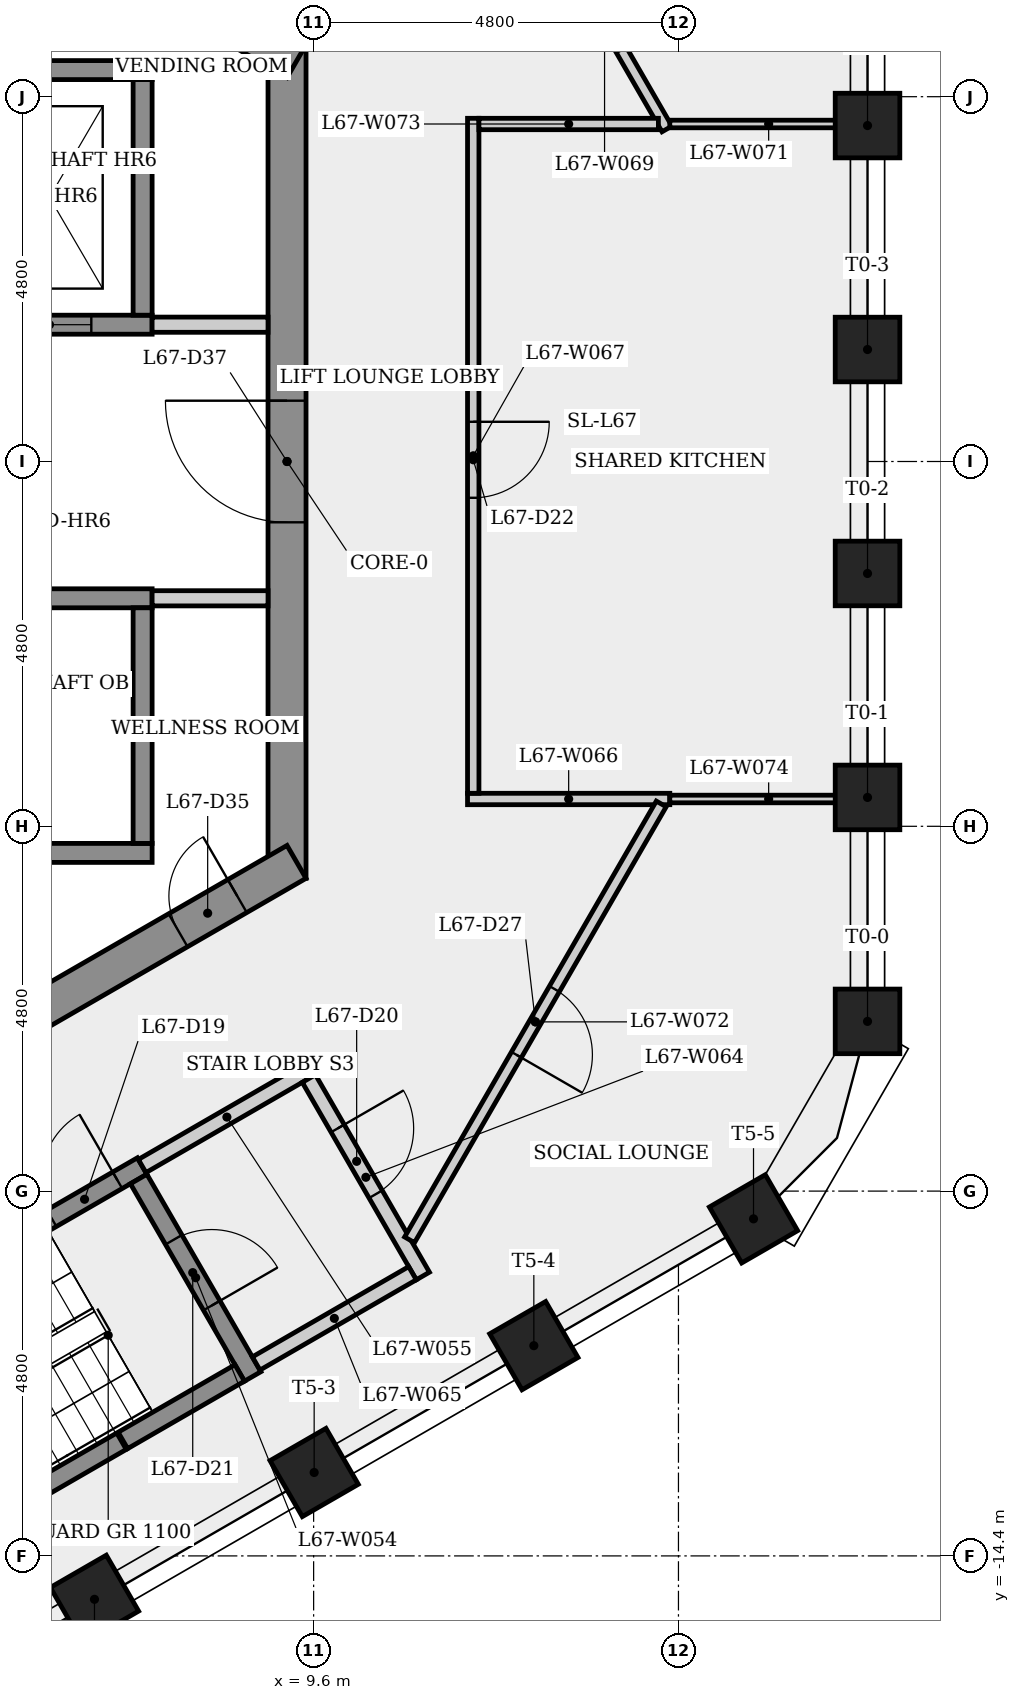
"""IFC4 building model, lengths in metres.
Left out: names, types, materials, properties, quantities, classifications, styles, units other than length and angle.
Written with IfcOpenShell. Run it as: python <this file> out.ifc"""

import sys

from ifc_helpers import new_model, si_unit, direction, frame, frame_2d, origin, origin_2d, place, context, subcontext, project, spatial, rectangle, extrude, element, fill, save


model = new_model("IFC4")
c1 = context("Model", 3, precision=1e-05, world=origin(), true_north=direction((0.0, 1.0)))
c2 = subcontext(c1, "Body", "Model", "MODEL_VIEW")
j1 = project(units=[si_unit("LENGTHUNIT", "METRE"), si_unit("PLANEANGLEUNIT", "RADIAN")], contexts=[c1])
p1 = place(None, origin())
s1 = spatial("IfcSite", under=j1, at=p1, CompositionType="ELEMENT")
p2 = place(p1, origin())
s2 = spatial("IfcBuilding", under=s1, at=p2, CompositionType="ELEMENT")
p3 = place(p2, frame((0.0, 0.0, 249.5)))
s3 = spatial("IfcBuildingStorey", under=s2, at=p3, CompositionType="ELEMENT", Elevation=249.5)
p4 = place(p3, frame((9.25, -5.485, 0.0), z_axis=(0.0, 0.0, 1.0), x_axis=(0.0, 1.0, 0.0)))
e1 = element("IfcWall", 1, at=p4, inside=s3, PredefinedType="SHEAR", context=c2, shape_type="SweptSolid", body=[
    extrude(rectangle(XDim=10.97, YDim=0.5, at=frame_2d((5.485, 0.0))), origin(), (0.0, 0.0, 1.0), 3.4),
])
p5 = place(p4, frame((4.685, 0.0, 0.0)))
e2 = element("IfcOpeningElement", 2, at=p5, cuts=e1, PredefinedType="OPENING", context=c2, shape_type="SweptSolid", body=[
    extrude(rectangle(XDim=1.6, YDim=2.1, at=frame_2d((0.8, 1.05))), frame((0.0, 0.26, 0.0), z_axis=(0.0, -1.0, 0.0), x_axis=(1.0, 0.0, 0.0)), (0.0, 0.0, 1.0), 0.52),
])
p6 = place(p3, frame((9.375, 5.268, 0.0), z_axis=(0.0, 0.0, 1.0), x_axis=(-0.866023993627, 0.500002442456, 0.0)))
e3 = element("IfcWall", 3, at=p6, inside=s3, PredefinedType="SHEAR", context=c2, shape_type="SweptSolid", body=[
    extrude(rectangle(XDim=10.97, YDim=0.5, at=frame_2d((5.485, 0.0))), origin(), (0.0, 0.0, 1.0), 3.4),
])
p7 = place(p6, frame((8.5, 0.0, 0.0)))
e4 = element("IfcOpeningElement", 4, at=p7, cuts=e3, PredefinedType="OPENING", context=c2, shape_type="SweptSolid", body=[
    extrude(rectangle(XDim=0.9, YDim=2.1, at=frame_2d((0.45, 1.05))), frame((0.0, 0.26, 0.0), z_axis=(0.0, -1.0, 0.0), x_axis=(1.0, 0.0, 0.0)), (0.0, 0.0, 1.0), 0.52),
])
p8 = place(p6, frame((3.28, 0.0, 0.0)))
e5 = element("IfcOpeningElement", 5, at=p8, cuts=e3, PredefinedType="OPENING", context=c2, shape_type="SweptSolid", body=[
    extrude(rectangle(XDim=0.9, YDim=2.1, at=frame_2d((0.45, 1.05))), frame((0.0, 0.26, 0.0), z_axis=(0.0, -1.0, 0.0), x_axis=(1.0, 0.0, 0.0)), (0.0, 0.0, 1.0), 0.52),
])
p9 = place(p3, frame((-0.125, -10.753, 0.0), z_axis=(0.0, 0.0, 1.0), x_axis=(0.866023993627, 0.500002442456, 0.0)))
e6 = element("IfcWall", 6, at=p9, inside=s3, PredefinedType="SHEAR", context=c2, shape_type="SweptSolid", body=[
    extrude(rectangle(XDim=10.97, YDim=0.5, at=frame_2d((5.485, 0.0))), origin(), (0.0, 0.0, 1.0), 3.4),
])
p10 = place(p9, frame((0.9, 0.0, 0.0)))
e7 = element("IfcOpeningElement", 7, at=p10, cuts=e6, PredefinedType="OPENING", context=c2, shape_type="SweptSolid", body=[
    extrude(rectangle(XDim=0.9, YDim=2.1, at=frame_2d((0.45, 1.05))), frame((0.0, 0.26, 0.0), z_axis=(0.0, -1.0, 0.0), x_axis=(1.0, 0.0, 0.0)), (0.0, 0.0, 1.0), 0.52),
])
p11 = place(p9, frame((9.17, 0.0, 0.0)))
e8 = element("IfcOpeningElement", 8, at=p11, cuts=e6, PredefinedType="OPENING", context=c2, shape_type="SweptSolid", body=[
    extrude(rectangle(XDim=0.9, YDim=2.1, at=frame_2d((0.45, 1.05))), frame((0.0, 0.26, 0.0), z_axis=(0.0, -1.0, 0.0), x_axis=(1.0, 0.0, 0.0)), (0.0, 0.0, 1.0), 0.52),
])
for number, where, z_axis, x_axis in (
    (9, (16.887, -7.367, 0.0), (0.0, 0.0, 1.0), (1.0, 0.0, 0.0)),
    (10, (16.887, -4.42, 0.0), (0.0, 0.0, 1.0), (1.0, 0.0, 0.0)),
    (11, (16.887, -1.473, 0.0), (0.0, 0.0, 1.0), (1.0, 0.0, 0.0)),
    (12, (16.887, 1.473, 0.0), (0.0, 0.0, 1.0), (1.0, 0.0, 0.0)),
    (13, (16.887, 4.42, 0.0), (0.0, 0.0, 1.0), (1.0, 0.0, 0.0)),
    (14, (6.717, -14.971, 0.0), (0.0, 0.0, 1.0), (0.5, -0.866, 0.0)),
    (15, (9.607, -13.302, 0.0), (0.0, 0.0, 1.0), (0.5, -0.866, 0.0)),
    (16, (12.497, -11.634, 0.0), (0.0, 0.0, 1.0), (0.5, -0.866, 0.0)),
    (17, (15.387, -9.965, 0.0), (0.0, 0.0, 1.0), (0.5, -0.866, 0.0)),
):
    element("IfcColumn", number, at=place(p3, frame(where, z_axis=z_axis, x_axis=x_axis)), inside=s3, PredefinedType="COLUMN", context=c2, shape_type="SweptSolid", body=[
        extrude(rectangle(XDim=0.85, YDim=0.85, at=origin_2d()), origin(), (0.0, 0.0, 1.0), 3.4),
    ])
p12 = place(p3, frame((-7.475, 1.8, 0.0), z_axis=(0.0, 0.0, 1.0), x_axis=(1.0, 0.0, 0.0)))
e18 = element("IfcWall", 18, at=p12, inside=s3, PredefinedType="SHEAR", context=c2, shape_type="SweptSolid", body=[
    extrude(rectangle(XDim=14.95, YDim=0.25, at=frame_2d((7.475, 0.0))), origin(), (0.0, 0.0, 1.0), 3.0),
])
p13 = place(p12, frame((0.8, 0.0, 0.0)))
e19 = element("IfcOpeningElement", 19, at=p13, cuts=e18, PredefinedType="OPENING", context=c2, shape_type="SweptSolid", body=[
    extrude(rectangle(XDim=1.1, YDim=2.1, at=frame_2d((0.55, 1.05))), frame((0.0, 0.135, 0.0), z_axis=(0.0, -1.0, 0.0), x_axis=(1.0, 0.0, 0.0)), (0.0, 0.0, 1.0), 0.27),
])
p14 = place(p12, frame((3.25, 0.0, 0.0)))
e20 = element("IfcOpeningElement", 20, at=p14, cuts=e18, PredefinedType="OPENING", context=c2, shape_type="SweptSolid", body=[
    extrude(rectangle(XDim=1.1, YDim=2.1, at=frame_2d((0.55, 1.05))), frame((0.0, 0.135, 0.0), z_axis=(0.0, -1.0, 0.0), x_axis=(1.0, 0.0, 0.0)), (0.0, 0.0, 1.0), 0.27),
])
p15 = place(p12, frame((5.7, 0.0, 0.0)))
e21 = element("IfcOpeningElement", 21, at=p15, cuts=e18, PredefinedType="OPENING", context=c2, shape_type="SweptSolid", body=[
    extrude(rectangle(XDim=1.1, YDim=2.1, at=frame_2d((0.55, 1.05))), frame((0.0, 0.135, 0.0), z_axis=(0.0, -1.0, 0.0), x_axis=(1.0, 0.0, 0.0)), (0.0, 0.0, 1.0), 0.27),
])
p16 = place(p12, frame((8.15, 0.0, 0.0)))
e22 = element("IfcOpeningElement", 22, at=p16, cuts=e18, PredefinedType="OPENING", context=c2, shape_type="SweptSolid", body=[
    extrude(rectangle(XDim=1.1, YDim=2.1, at=frame_2d((0.55, 1.05))), frame((0.0, 0.135, 0.0), z_axis=(0.0, -1.0, 0.0), x_axis=(1.0, 0.0, 0.0)), (0.0, 0.0, 1.0), 0.27),
])
p17 = place(p12, frame((10.6, 0.0, 0.0)))
e23 = element("IfcOpeningElement", 23, at=p17, cuts=e18, PredefinedType="OPENING", context=c2, shape_type="SweptSolid", body=[
    extrude(rectangle(XDim=1.1, YDim=2.1, at=frame_2d((0.55, 1.05))), frame((0.0, 0.135, 0.0), z_axis=(0.0, -1.0, 0.0), x_axis=(1.0, 0.0, 0.0)), (0.0, 0.0, 1.0), 0.27),
])
p18 = place(p12, frame((13.05, 0.0, 0.0)))
e24 = element("IfcOpeningElement", 24, at=p18, cuts=e18, PredefinedType="OPENING", context=c2, shape_type="SweptSolid", body=[
    extrude(rectangle(XDim=1.1, YDim=2.1, at=frame_2d((0.55, 1.05))), frame((0.0, 0.135, 0.0), z_axis=(0.0, -1.0, 0.0), x_axis=(1.0, 0.0, 0.0)), (0.0, 0.0, 1.0), 0.27),
])
p19 = place(p3, frame((-7.225, 5.15, 0.0), z_axis=(0.0, 0.0, 1.0), x_axis=(1.0, 0.0, 0.0)))
e25 = element("IfcWall", 25, at=p19, inside=s3, PredefinedType="SHEAR", context=c2, shape_type="SweptSolid", body=[
    extrude(rectangle(XDim=14.7, YDim=0.25, at=frame_2d((7.35, 0.0))), origin(), (0.0, 0.0, 1.0), 3.0),
])
p20 = place(p3, frame((1.693, -12.532, 0.0), z_axis=(0.0, 0.0, 1.0), x_axis=(0.866031063448, 0.499990197047, 0.0)))
e26 = element("IfcWall", 26, at=p20, inside=s3, PredefinedType="SHEAR", context=c2, shape_type="SweptSolid", body=[
    extrude(rectangle(XDim=6.525, YDim=0.25, at=frame_2d((3.263, 0.0))), origin(), (0.0, 0.0, 1.0), 3.0),
])
p21 = place(p20, frame((5.15, 0.0, 0.0)))
e27 = element("IfcOpeningElement", 27, at=p21, cuts=e26, PredefinedType="OPENING", context=c2, shape_type="SweptSolid", body=[
    extrude(rectangle(XDim=1.0, YDim=2.1, at=frame_2d((0.5, 1.05))), frame((0.0, 0.135, 0.0), z_axis=(0.0, -1.0, 0.0), x_axis=(1.0, 0.0, 0.0)), (0.0, 0.0, 1.0), 0.27),
])
p22 = place(p3, frame((2.575, -5.15, 0.0), z_axis=(0.0, 0.0, 1.0), x_axis=(1.0, 0.0, 0.0)))
e28 = element("IfcWall", 28, at=p22, inside=s3, PredefinedType="SHEAR", context=c2, shape_type="SweptSolid", body=[
    extrude(rectangle(XDim=4.9, YDim=0.25, at=frame_2d((2.45, 0.0))), origin(), (0.0, 0.0, 1.0), 3.0),
])
p23 = place(p3, frame((2.575, -1.8, 0.0), z_axis=(0.0, 0.0, 1.0), x_axis=(1.0, 0.0, 0.0)))
e29 = element("IfcWall", 29, at=p23, inside=s3, PredefinedType="SHEAR", context=c2, shape_type="SweptSolid", body=[
    extrude(rectangle(XDim=4.9, YDim=0.25, at=frame_2d((2.45, 0.0))), origin(), (0.0, 0.0, 1.0), 3.0),
])
p24 = place(p23, frame((0.597, 0.0, 0.0)))
e30 = element("IfcOpeningElement", 30, at=p24, cuts=e29, PredefinedType="OPENING", context=c2, shape_type="SweptSolid", body=[
    extrude(rectangle(XDim=1.1, YDim=2.1, at=frame_2d((0.55, 1.05))), frame((0.0, 0.135, 0.0), z_axis=(0.0, -1.0, 0.0), x_axis=(1.0, 0.0, 0.0)), (0.0, 0.0, 1.0), 0.27),
])
p25 = place(p3, frame((7.073, -12.891, 0.0), z_axis=(0.0, 0.0, 1.0), x_axis=(-0.866023145199, -0.500003911965, 0.0)))
e31 = element("IfcWall", 31, at=p25, inside=s3, PredefinedType="SHEAR", context=c2, shape_type="SweptSolid", body=[
    extrude(rectangle(XDim=4.355, YDim=0.25, at=frame_2d((2.177, 0.0))), origin(), (0.0, 0.0, 1.0), 3.0),
])
p26 = place(p3, frame((7.298, -9.441, 0.0), z_axis=(0.0, 0.0, 1.0), x_axis=(0.50002537861, -0.866010750942, 0.0)))
e32 = element("IfcWall", 32, at=p26, inside=s3, PredefinedType="SHEAR", context=c2, shape_type="SweptSolid", body=[
    extrude(rectangle(XDim=3.0, YDim=0.25, at=frame_2d((1.5, 0.0))), origin(), (0.0, 0.0, 1.0), 3.0),
])
p27 = place(p26, frame((0.923, 0.0, 0.0)))
e33 = element("IfcOpeningElement", 33, at=p27, cuts=e32, PredefinedType="OPENING", context=c2, shape_type="SweptSolid", body=[
    extrude(rectangle(XDim=1.0, YDim=2.1, at=frame_2d((0.5, 1.05))), frame((0.0, 0.135, 0.0), z_axis=(0.0, -1.0, 0.0), x_axis=(1.0, 0.0, 0.0)), (0.0, 0.0, 1.0), 0.27),
])
p28 = place(p3, frame((7.344, -9.27, 0.0), z_axis=(0.0, 0.0, 1.0), x_axis=(0.866005588531, 0.500034319456, 0.0)))
e34 = element("IfcWall", 34, at=p28, inside=s3, PredefinedType="PARTITIONING", context=c2, shape_type="SweptSolid", body=[
    extrude(rectangle(XDim=2.575, YDim=0.2, at=frame_2d((1.288, 0.0))), origin(), (0.0, 0.0, 1.0), 3.0),
])
p29 = place(p3, frame((7.475, 1.8, 0.0), z_axis=(0.0, 0.0, 1.0), x_axis=(1.0, 0.0, 0.0)))
e35 = element("IfcWall", 35, at=p29, inside=s3, PredefinedType="PARTITIONING", context=c2, shape_type="SweptSolid", body=[
    extrude(rectangle(XDim=1.525, YDim=0.2, at=frame_2d((0.763, 0.0))), origin(), (0.0, 0.0, 1.0), 3.0),
])
for number, where, z_axis, x_axis in (
    (36, (7.35, -1.925, 0.0), (0.0, 0.0, 1.0), (0.0, -1.0, 0.0)),
    (37, (7.35, 5.025, 0.0), (0.0, 0.0, 1.0), (0.0, -1.0, 0.0)),
):
    element("IfcWall", number, at=place(p3, frame(where, z_axis=z_axis, x_axis=x_axis)), inside=s3, PredefinedType="SHEAR", context=c2, shape_type="SweptSolid", body=[
        extrude(rectangle(XDim=3.1, YDim=0.25, at=frame_2d((1.55, 0.0))), origin(), (0.0, 0.0, 1.0), 3.4),
    ])
p30 = place(p3, frame((8.627, -11.993, 0.0), z_axis=(0.0, 0.0, 1.0), x_axis=(-0.866059624469, -0.499940723351, 0.0)))
e38 = element("IfcWall", 38, at=p30, inside=s3, PredefinedType="SHEAR", context=c2, shape_type="SweptSolid", body=[
    extrude(rectangle(XDim=1.775, YDim=0.25, at=frame_2d((0.888, 0.0))), origin(), (0.0, 0.0, 1.0), 3.0),
])
p31 = place(p3, frame((9.0, -1.8, 0.0), z_axis=(0.0, 0.0, 1.0), x_axis=(-1.0, 0.0, 0.0)))
e39 = element("IfcWall", 39, at=p31, inside=s3, PredefinedType="PARTITIONING", context=c2, shape_type="SweptSolid", body=[
    extrude(rectangle(XDim=1.525, YDim=0.2, at=frame_2d((0.763, 0.0))), origin(), (0.0, 0.0, 1.0), 3.0),
])
p32 = place(p3, frame((9.537, -8.119, 0.0), z_axis=(0.0, 0.0, 1.0), x_axis=(0.499990139034, -0.866031096941, 0.0)))
e40 = element("IfcWall", 40, at=p32, inside=s3, PredefinedType="PARTITIONING", context=c2, shape_type="SweptSolid", body=[
    extrude(rectangle(XDim=3.0, YDim=0.2, at=frame_2d((1.5, 0.0))), origin(), (0.0, 0.0, 1.0), 3.0),
])
p33 = place(p32, frame((0.758, 0.0, 0.0)))
e41 = element("IfcOpeningElement", 41, at=p33, cuts=e40, PredefinedType="OPENING", context=c2, shape_type="SweptSolid", body=[
    extrude(rectangle(XDim=1.0, YDim=2.1, at=frame_2d((0.5, 1.05))), frame((0.0, 0.11, 0.0), z_axis=(0.0, -1.0, 0.0), x_axis=(1.0, 0.0, 0.0)), (0.0, 0.0, 1.0), 0.22),
])
p34 = place(p3, frame((10.901, -10.681, 0.0), z_axis=(0.0, 0.0, 1.0), x_axis=(-0.866007538022, -0.500030943131, 0.0)))
e42 = element("IfcWall", 42, at=p34, inside=s3, PredefinedType="PARTITIONING", context=c2, shape_type="SweptSolid", body=[
    extrude(rectangle(XDim=2.375, YDim=0.2, at=frame_2d((1.188, 0.0))), origin(), (0.0, 0.0, 1.0), 3.0),
])
p35 = place(p3, frame((11.625, -4.441, 0.0), z_axis=(0.0, 0.0, 1.0), x_axis=(1.0, 0.0, 0.0)))
e43 = element("IfcWall", 43, at=p35, inside=s3, PredefinedType="PARTITIONING", context=c2, shape_type="SweptSolid", body=[
    extrude(rectangle(XDim=2.661, YDim=0.15, at=frame_2d((1.331, 0.0))), origin(), (0.0, 0.0, 1.0), 3.0),
])
p36 = place(p3, frame((11.7, 4.516, 0.0), z_axis=(0.0, 0.0, 1.0), x_axis=(0.0, -1.0, 0.0)))
e44 = element("IfcWall", 44, at=p36, inside=s3, PredefinedType="PARTITIONING", context=c2, shape_type="SweptSolid", body=[
    extrude(rectangle(XDim=8.881, YDim=0.15, at=frame_2d((4.441, 0.0))), origin(), (0.0, 0.0, 1.0), 3.0),
])
p37 = place(p36, frame((3.993, 0.0, 0.0)))
e45 = element("IfcOpeningElement", 45, at=p37, cuts=e44, PredefinedType="OPENING", context=c2, shape_type="SweptSolid", body=[
    extrude(rectangle(XDim=1.0, YDim=2.1, at=frame_2d((0.5, 1.05))), frame((0.0, 0.085, 0.0), z_axis=(0.0, -1.0, 0.0), x_axis=(1.0, 0.0, 0.0)), (0.0, 0.0, 1.0), 0.17),
])
p38 = place(p3, frame((12.607, 7.219, 0.0), z_axis=(0.0, 0.0, 1.0), x_axis=(0.499977771575, -0.866038236991, 0.0)))
e46 = element("IfcWall", 46, at=p38, inside=s3, PredefinedType="PARTITIONING", context=c2, shape_type="SweptSolid", body=[
    extrude(rectangle(XDim=3.283, YDim=0.15, at=frame_2d((1.642, 0.0))), origin(), (0.0, 0.0, 1.0), 3.0),
])
p39 = place(p38, frame((1.087, 0.0, 0.0)))
e47 = element("IfcOpeningElement", 47, at=p39, cuts=e46, PredefinedType="OPENING", context=c2, shape_type="SweptSolid", body=[
    extrude(rectangle(XDim=1.0, YDim=2.1, at=frame_2d((0.5, 1.05))), frame((0.0, 0.085, 0.0), z_axis=(0.0, -1.0, 0.0), x_axis=(1.0, 0.0, 0.0)), (0.0, 0.0, 1.0), 0.17),
])
p40 = place(p3, frame((14.286, 4.441, 0.0), z_axis=(0.0, 0.0, 1.0), x_axis=(1.0, 0.0, 0.0)))
e48 = element("IfcWall", 48, at=p40, inside=s3, PredefinedType="PARTITIONING", context=c2, shape_type="SweptSolid", body=[
    extrude(rectangle(XDim=2.602, YDim=0.1, at=frame_2d((1.301, 0.0))), origin(), (0.0, 0.0, 1.0), 3.0),
])
p41 = place(p3, frame((14.174, -4.506, 0.0), z_axis=(0.0, 0.0, 1.0), x_axis=(-0.499996888874, -0.866027199987, 0.0)))
e49 = element("IfcWall", 49, at=p41, inside=s3, PredefinedType="PARTITIONING", context=c2, shape_type="SweptSolid", body=[
    extrude(rectangle(XDim=6.623, YDim=0.15, at=frame_2d((3.311, 0.0))), origin(), (0.0, 0.0, 1.0), 3.0),
])
p42 = place(p41, frame((2.811, 0.0, 0.0)))
e50 = element("IfcOpeningElement", 50, at=p42, cuts=e49, PredefinedType="OPENING", context=c2, shape_type="SweptSolid", body=[
    extrude(rectangle(XDim=1.0, YDim=2.1, at=frame_2d((0.5, 1.05))), frame((0.0, 0.085, 0.0), z_axis=(0.0, -1.0, 0.0), x_axis=(1.0, 0.0, 0.0)), (0.0, 0.0, 1.0), 0.17),
])
p43 = place(p3, frame((14.136, 4.441, 0.0), z_axis=(0.0, 0.0, 1.0), x_axis=(-1.0, 0.0, 0.0)))
e51 = element("IfcWall", 51, at=p43, inside=s3, PredefinedType="PARTITIONING", context=c2, shape_type="SweptSolid", body=[
    extrude(rectangle(XDim=2.361, YDim=0.15, at=frame_2d((1.181, 0.0))), origin(), (0.0, 0.0, 1.0), 3.0),
])
p44 = place(p3, frame((16.887, -4.441, 0.0), z_axis=(0.0, 0.0, 1.0), x_axis=(-1.0, 0.0, 0.0)))
e52 = element("IfcWall", 52, at=p44, inside=s3, PredefinedType="PARTITIONING", context=c2, shape_type="SweptSolid", body=[
    extrude(rectangle(XDim=2.602, YDim=0.1, at=frame_2d((1.301, 0.0))), origin(), (0.0, 0.0, 1.0), 3.0),
])
p45 = place(p18, origin())
e53 = element("IfcDoor", 53, at=p45, inside=s3, OperationType="SLIDING_TO_LEFT", PredefinedType="DOOR", context=c2, shape_type="SweptSolid", body=[
    extrude(rectangle(XDim=1.1, YDim=2.1, at=frame_2d((0.55, 1.05))), frame((0.0, 0.025, 0.0), z_axis=(0.0, -1.0, 0.0), x_axis=(1.0, 0.0, 0.0)), (0.0, 0.0, 1.0), 0.05),
])
fill(e24, e53)
p46 = place(p21, origin())
e54 = element("IfcDoor", 54, at=p46, inside=s3, OperationType="SINGLE_SWING_RIGHT", PredefinedType="DOOR", context=c2, shape_type="SweptSolid", body=[
    extrude(rectangle(XDim=1.0, YDim=2.1, at=frame_2d((0.5, 1.05))), frame((0.0, 0.025, 0.0), z_axis=(0.0, -1.0, 0.0), x_axis=(1.0, 0.0, 0.0)), (0.0, 0.0, 1.0), 0.05),
])
fill(e27, e54)
p47 = place(p33, origin())
e55 = element("IfcDoor", 55, at=p47, inside=s3, OperationType="SINGLE_SWING_LEFT", PredefinedType="DOOR", context=c2, shape_type="SweptSolid", body=[
    extrude(rectangle(XDim=1.0, YDim=2.1, at=frame_2d((0.5, 1.05))), frame((0.0, 0.025, 0.0), z_axis=(0.0, -1.0, 0.0), x_axis=(1.0, 0.0, 0.0)), (0.0, 0.0, 1.0), 0.05),
])
fill(e41, e55)
p48 = place(p27, origin())
e56 = element("IfcDoor", 56, at=p48, inside=s3, OperationType="SINGLE_SWING_RIGHT", PredefinedType="DOOR", context=c2, shape_type="SweptSolid", body=[
    extrude(rectangle(XDim=1.0, YDim=2.1, at=frame_2d((0.5, 1.05))), frame((0.0, 0.025, 0.0), z_axis=(0.0, -1.0, 0.0), x_axis=(1.0, 0.0, 0.0)), (0.0, 0.0, 1.0), 0.05),
])
fill(e33, e56)
p49 = place(p37, origin())
e57 = element("IfcDoor", 57, at=p49, inside=s3, OperationType="SINGLE_SWING_LEFT", PredefinedType="DOOR", context=c2, shape_type="SweptSolid", body=[
    extrude(rectangle(XDim=1.0, YDim=2.1, at=frame_2d((0.5, 1.05))), frame((0.0, 0.025, 0.0), z_axis=(0.0, -1.0, 0.0), x_axis=(1.0, 0.0, 0.0)), (0.0, 0.0, 1.0), 0.05),
])
fill(e45, e57)
p50 = place(p42, origin())
e58 = element("IfcDoor", 58, at=p50, inside=s3, OperationType="SINGLE_SWING_RIGHT", PredefinedType="DOOR", context=c2, shape_type="SweptSolid", body=[
    extrude(rectangle(XDim=1.0, YDim=2.1, at=frame_2d((0.5, 1.05))), frame((0.0, 0.025, 0.0), z_axis=(0.0, -1.0, 0.0), x_axis=(1.0, 0.0, 0.0)), (0.0, 0.0, 1.0), 0.05),
])
fill(e50, e58)
p51 = place(p11, origin())
e59 = element("IfcDoor", 59, at=p51, inside=s3, OperationType="SINGLE_SWING_RIGHT", PredefinedType="DOOR", context=c2, shape_type="SweptSolid", body=[
    extrude(rectangle(XDim=0.9, YDim=2.1, at=frame_2d((0.45, 1.05))), frame((0.0, 0.025, 0.0), z_axis=(0.0, -1.0, 0.0), x_axis=(1.0, 0.0, 0.0)), (0.0, 0.0, 1.0), 0.05),
])
fill(e8, e59)
p52 = place(p5, origin())
e60 = element("IfcDoor", 60, at=p52, inside=s3, OperationType="SINGLE_SWING_RIGHT", PredefinedType="DOOR", context=c2, shape_type="SweptSolid", body=[
    extrude(rectangle(XDim=1.6, YDim=2.1, at=frame_2d((0.8, 1.05))), frame((0.0, 0.025, 0.0), z_axis=(0.0, -1.0, 0.0), x_axis=(1.0, 0.0, 0.0)), (0.0, 0.0, 1.0), 0.05),
])
fill(e2, e60)
save(model, sys.argv[1])
